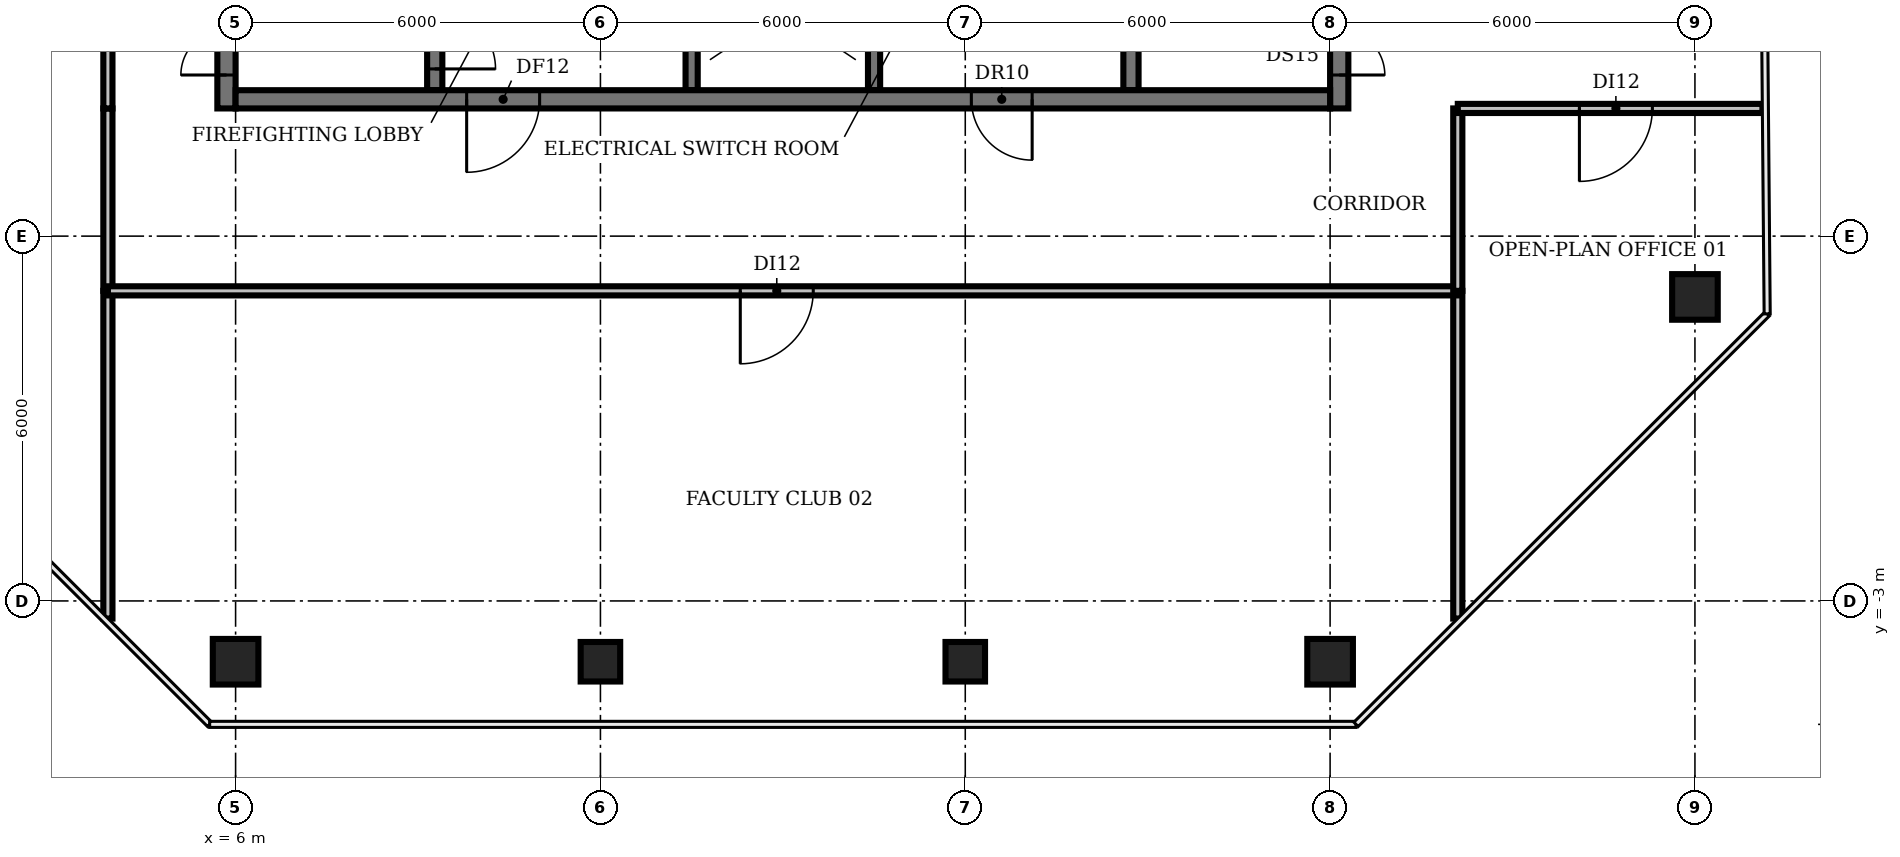
"""IFC4 building model, lengths in metres.
Left out: names, types, materials, properties, quantities, classifications, styles, units other than length and angle.
Written with IfcOpenShell. Run it as: python <this file> out.ifc"""

import sys

from ifc_helpers import new_model, si_unit, direction, frame, frame_2d, origin, origin_2d, place, context, subcontext, project, spatial, rectangle, circle, extrude, element, fill, save


model = new_model("IFC4")
c1 = context("Model", 3, precision=1e-05, world=origin(), true_north=direction((0.0, 1.0)))
c2 = subcontext(c1, "Body", "Model", "MODEL_VIEW")
j1 = project(units=[si_unit("LENGTHUNIT", "METRE"), si_unit("PLANEANGLEUNIT", "RADIAN")], contexts=[c1])
p1 = place(None, origin())
s1 = spatial("IfcSite", under=j1, at=p1, CompositionType="ELEMENT")
p2 = place(p1, origin())
s2 = spatial("IfcBuilding", under=s1, at=p2, CompositionType="ELEMENT")
p3 = place(p2, frame((0.0, 0.0, 331.4)))
s3 = spatial("IfcBuildingStorey", under=s2, at=p3, CompositionType="ELEMENT", Elevation=331.4)
p4 = place(p3, frame((6.0, -4.0, 0.0), z_axis=(0.0, 0.0, 1.0), x_axis=(1.0, 0.0, 0.0)))
e1 = element("IfcColumn", 1, at=p4, inside=s3, PredefinedType="COLUMN", context=c2, shape_type="SweptSolid", body=[
    extrude(circle(Radius=0.375, at=origin_2d()), origin(), (0.0, 0.0, 1.0), 3.9),
])
for number, where, z_axis, x_axis in (
    (2, (12.0, -4.0, 0.0), (0.0, 0.0, 1.0), (1.0, 0.0, 0.0)),
    (3, (18.0, -4.0, 0.0), (0.0, 0.0, 1.0), (1.0, 0.0, 0.0)),
):
    element("IfcColumn", number, at=place(p3, frame(where, z_axis=z_axis, x_axis=x_axis)), inside=s3, PredefinedType="COLUMN", context=c2, shape_type="SweptSolid", body=[
        extrude(rectangle(XDim=0.65, YDim=0.65, at=origin_2d()), origin(), (0.0, 0.0, 1.0), 3.9),
    ])
for number, where, z_axis, x_axis in (
    (4, (24.0, -4.0, 0.0), (0.0, 0.0, 1.0), (1.0, 0.0, 0.0)),
    (5, (30.0, 2.0, 0.0), (0.0, 0.0, 1.0), (1.0, 0.0, 0.0)),
):
    element("IfcColumn", number, at=place(p3, frame(where, z_axis=z_axis, x_axis=x_axis)), inside=s3, PredefinedType="COLUMN", context=c2, shape_type="SweptSolid", body=[
        extrude(circle(Radius=0.375, at=origin_2d()), origin(), (0.0, 0.0, 1.0), 3.9),
    ])
p5 = place(p3, frame((9.275, 11.825, 0.0), z_axis=(0.0, 0.0, 1.0), x_axis=(0.0, -1.0, 0.0)))
e6 = element("IfcWall", 6, at=p5, inside=s3, PredefinedType="SHEAR", context=c2, shape_type="SweptSolid", body=[
    extrude(rectangle(XDim=6.425, YDim=0.25, at=frame_2d((3.212, 0.0))), origin(), (0.0, 0.0, 1.0), 3.9),
])
p6 = place(p5, frame((5.075, 0.0, 0.0)))
e7 = element("IfcOpeningElement", 7, at=p6, cuts=e6, PredefinedType="OPENING", context=c2, shape_type="SweptSolid", body=[
    extrude(rectangle(XDim=1.0, YDim=2.1, at=frame_2d((0.5, 1.05))), frame((0.0, 0.135, 0.0), z_axis=(0.0, -1.0, 0.0), x_axis=(1.0, 0.0, 0.0)), (0.0, 0.0, 1.0), 0.27),
])
p7 = place(p3, frame((13.5, 5.4, 0.0), z_axis=(0.0, 0.0, 1.0), x_axis=(0.0, 1.0, 0.0)))
e8 = element("IfcWall", 8, at=p7, inside=s3, PredefinedType="SHEAR", context=c2, shape_type="SweptSolid", body=[
    extrude(rectangle(XDim=8.2, YDim=0.2, at=frame_2d((4.1, 0.0))), origin(), (0.0, 0.0, 1.0), 3.9),
])
p8 = place(p7, frame((0.75, 0.0, 0.0)))
e9 = element("IfcOpeningElement", 9, at=p8, cuts=e8, PredefinedType="OPENING", context=c2, shape_type="SweptSolid", body=[
    extrude(rectangle(XDim=1.1, YDim=2.1, at=frame_2d((0.55, 1.05))), frame((0.0, 0.11, 0.0), z_axis=(0.0, -1.0, 0.0), x_axis=(1.0, 0.0, 0.0)), (0.0, 0.0, 1.0), 0.22),
])
p9 = place(p7, frame((3.55, 0.0, 0.0)))
e10 = element("IfcOpeningElement", 10, at=p9, cuts=e8, PredefinedType="OPENING", context=c2, shape_type="SweptSolid", body=[
    extrude(rectangle(XDim=1.1, YDim=2.1, at=frame_2d((0.55, 1.05))), frame((0.0, 0.11, 0.0), z_axis=(0.0, -1.0, 0.0), x_axis=(1.0, 0.0, 0.0)), (0.0, 0.0, 1.0), 0.22),
])
p10 = place(p7, frame((6.35, 0.0, 0.0)))
e11 = element("IfcOpeningElement", 11, at=p10, cuts=e8, PredefinedType="OPENING", context=c2, shape_type="SweptSolid", body=[
    extrude(rectangle(XDim=1.1, YDim=2.1, at=frame_2d((0.55, 1.05))), frame((0.0, 0.11, 0.0), z_axis=(0.0, -1.0, 0.0), x_axis=(1.0, 0.0, 0.0)), (0.0, 0.0, 1.0), 0.22),
])
p11 = place(p3, frame((16.5, 5.4, 0.0), z_axis=(0.0, 0.0, 1.0), x_axis=(0.0, 1.0, 0.0)))
e12 = element("IfcWall", 12, at=p11, inside=s3, PredefinedType="SHEAR", context=c2, shape_type="SweptSolid", body=[
    extrude(rectangle(XDim=8.2, YDim=0.2, at=frame_2d((4.1, 0.0))), origin(), (0.0, 0.0, 1.0), 3.9),
])
p12 = place(p3, frame((20.725, 5.4, 0.0), z_axis=(0.0, 0.0, 1.0), x_axis=(0.0, 1.0, 0.0)))
e13 = element("IfcWall", 13, at=p12, inside=s3, PredefinedType="SHEAR", context=c2, shape_type="SweptSolid", body=[
    extrude(rectangle(XDim=6.3, YDim=0.25, at=frame_2d((3.15, 0.0))), origin(), (0.0, 0.0, 1.0), 3.9),
])
p13 = place(p3, frame((5.85, 5.1, 0.0), z_axis=(0.0, 0.0, 1.0), x_axis=(0.0, 1.0, 0.0)))
e14 = element("IfcWall", 14, at=p13, inside=s3, PredefinedType="SHEAR", context=c2, shape_type="SweptSolid", body=[
    extrude(rectangle(XDim=20.0, YDim=0.3, at=frame_2d((10.0, 0.0))), origin(), (0.0, 0.0, 1.0), 3.9),
])
p14 = place(p13, frame((0.55, 0.0, 0.0)))
e15 = element("IfcOpeningElement", 15, at=p14, cuts=e14, PredefinedType="OPENING", context=c2, shape_type="SweptSolid", body=[
    extrude(rectangle(XDim=1.5, YDim=2.1, at=frame_2d((0.75, 1.05))), frame((0.0, 0.16, 0.0), z_axis=(0.0, -1.0, 0.0), x_axis=(1.0, 0.0, 0.0)), (0.0, 0.0, 1.0), 0.32),
])
p15 = place(p13, frame((7.0, 0.0, 0.0)))
e16 = element("IfcOpeningElement", 16, at=p15, cuts=e14, PredefinedType="OPENING", context=c2, shape_type="SweptSolid", body=[
    extrude(rectangle(XDim=1.2, YDim=2.1, at=frame_2d((0.6, 1.05))), frame((0.0, 0.16, 0.0), z_axis=(0.0, -1.0, 0.0), x_axis=(1.0, 0.0, 0.0)), (0.0, 0.0, 1.0), 0.32),
])
p16 = place(p13, frame((13.55, 0.0, 0.0)))
e17 = element("IfcOpeningElement", 17, at=p16, cuts=e14, PredefinedType="OPENING", context=c2, shape_type="SweptSolid", body=[
    extrude(rectangle(XDim=1.2, YDim=2.1, at=frame_2d((0.6, 1.05))), frame((0.0, 0.16, 0.0), z_axis=(0.0, -1.0, 0.0), x_axis=(1.0, 0.0, 0.0)), (0.0, 0.0, 1.0), 0.32),
])
p17 = place(p3, frame((24.15, 25.705, 0.0), z_axis=(0.0, 0.0, 1.0), x_axis=(0.0, -1.0, 0.0)))
e18 = element("IfcWall", 18, at=p17, inside=s3, PredefinedType="SHEAR", context=c2, shape_type="SweptSolid", body=[
    extrude(rectangle(XDim=20.605, YDim=0.3, at=frame_2d((10.302, 0.0))), origin(), (0.0, 0.0, 1.0), 3.9),
])
p18 = place(p17, frame((18.555, 0.0, 0.0)))
e19 = element("IfcOpeningElement", 19, at=p18, cuts=e18, PredefinedType="OPENING", context=c2, shape_type="SweptSolid", body=[
    extrude(rectangle(XDim=1.5, YDim=2.1, at=frame_2d((0.75, 1.05))), frame((0.0, 0.16, 0.0), z_axis=(0.0, -1.0, 0.0), x_axis=(1.0, 0.0, 0.0)), (0.0, 0.0, 1.0), 0.32),
])
p19 = place(p17, frame((12.455, 0.0, 0.0)))
e20 = element("IfcOpeningElement", 20, at=p19, cuts=e18, PredefinedType="OPENING", context=c2, shape_type="SweptSolid", body=[
    extrude(rectangle(XDim=0.9, YDim=2.1, at=frame_2d((0.45, 1.05))), frame((0.0, 0.16, 0.0), z_axis=(0.0, -1.0, 0.0), x_axis=(1.0, 0.0, 0.0)), (0.0, 0.0, 1.0), 0.32),
])
p20 = place(p17, frame((6.455, 0.0, 0.0)))
e21 = element("IfcOpeningElement", 21, at=p20, cuts=e18, PredefinedType="OPENING", context=c2, shape_type="SweptSolid", body=[
    extrude(rectangle(XDim=2.0, YDim=2.1, at=frame_2d((1.0, 1.05))), frame((0.0, 0.16, 0.0), z_axis=(0.0, -1.0, 0.0), x_axis=(1.0, 0.0, 0.0)), (0.0, 0.0, 1.0), 0.32),
])
p21 = place(p3, frame((24.0, 5.25, 0.0), z_axis=(0.0, 0.0, 1.0), x_axis=(-1.0, 0.0, 0.0)))
e22 = element("IfcWall", 22, at=p21, inside=s3, PredefinedType="SHEAR", context=c2, shape_type="SweptSolid", body=[
    extrude(rectangle(XDim=18.0, YDim=0.3, at=frame_2d((9.0, 0.0))), origin(), (0.0, 0.0, 1.0), 3.9),
])
p22 = place(p21, frame((13.0, 0.0, 0.0)))
e23 = element("IfcOpeningElement", 23, at=p22, cuts=e22, PredefinedType="OPENING", context=c2, shape_type="SweptSolid", body=[
    extrude(rectangle(XDim=1.2, YDim=2.1, at=frame_2d((0.6, 1.05))), frame((0.0, 0.16, 0.0), z_axis=(0.0, -1.0, 0.0), x_axis=(1.0, 0.0, 0.0)), (0.0, 0.0, 1.0), 0.32),
])
p23 = place(p21, frame((4.9, 0.0, 0.0)))
e24 = element("IfcOpeningElement", 24, at=p23, cuts=e22, PredefinedType="OPENING", context=c2, shape_type="SweptSolid", body=[
    extrude(rectangle(XDim=1.0, YDim=2.1, at=frame_2d((0.5, 1.05))), frame((0.0, 0.16, 0.0), z_axis=(0.0, -1.0, 0.0), x_axis=(1.0, 0.0, 0.0)), (0.0, 0.0, 1.0), 0.32),
])
p24 = place(p3, frame((3.9, -3.29, 0.0), z_axis=(0.0, 0.0, 1.0), x_axis=(0.0, 1.0, 0.0)))
e25 = element("IfcWall", 25, at=p24, inside=s3, PredefinedType="PARTITIONING", context=c2, shape_type="SweptSolid", body=[
    extrude(rectangle(XDim=5.39, YDim=0.15, at=frame_2d((2.695, 0.0))), origin(), (0.0, 0.0, 1.0), 2.48),
])
p25 = place(p3, frame((3.9, 2.1, 0.0), z_axis=(0.0, 0.0, 1.0), x_axis=(0.0, 1.0, 0.0)))
e26 = element("IfcWall", 26, at=p25, inside=s3, PredefinedType="PARTITIONING", context=c2, shape_type="SweptSolid", body=[
    extrude(rectangle(XDim=3.0, YDim=0.15, at=frame_2d((1.5, 0.0))), origin(), (0.0, 0.0, 1.0), 2.48),
])
p26 = place(p3, frame((3.9, 5.1, 0.0), z_axis=(0.0, 0.0, 1.0), x_axis=(0.0, 1.0, 0.0)))
e27 = element("IfcWall", 27, at=p26, inside=s3, PredefinedType="PARTITIONING", context=c2, shape_type="SweptSolid", body=[
    extrude(rectangle(XDim=13.9, YDim=0.15, at=frame_2d((6.95, 0.0))), origin(), (0.0, 0.0, 1.0), 2.48),
])
p27 = place(p26, frame((6.2, 0.0, 0.0)))
e28 = element("IfcOpeningElement", 28, at=p27, cuts=e27, PredefinedType="OPENING", context=c2, shape_type="SweptSolid", body=[
    extrude(rectangle(XDim=1.2, YDim=2.1, at=frame_2d((0.6, 1.05))), frame((0.0, 0.085, 0.0), z_axis=(0.0, -1.0, 0.0), x_axis=(1.0, 0.0, 0.0)), (0.0, 0.0, 1.0), 0.17),
])
p28 = place(p3, frame((26.1, -3.29, 0.0), z_axis=(0.0, 0.0, 1.0), x_axis=(0.0, 1.0, 0.0)))
e29 = element("IfcWall", 29, at=p28, inside=s3, PredefinedType="PARTITIONING", context=c2, shape_type="SweptSolid", body=[
    extrude(rectangle(XDim=5.39, YDim=0.15, at=frame_2d((2.695, 0.0))), origin(), (0.0, 0.0, 1.0), 2.48),
])
p29 = place(p3, frame((26.1, 2.1, 0.0), z_axis=(0.0, 0.0, 1.0), x_axis=(-1.0, 0.0, 0.0)))
e30 = element("IfcWall", 30, at=p29, inside=s3, PredefinedType="PARTITIONING", context=c2, shape_type="SweptSolid", body=[
    extrude(rectangle(XDim=22.2, YDim=0.15, at=frame_2d((11.1, 0.0))), origin(), (0.0, 0.0, 1.0), 2.48),
])
p30 = place(p29, frame((10.6, 0.0, 0.0)))
e31 = element("IfcOpeningElement", 31, at=p30, cuts=e30, PredefinedType="OPENING", context=c2, shape_type="SweptSolid", body=[
    extrude(rectangle(XDim=1.2, YDim=2.1, at=frame_2d((0.6, 1.05))), frame((0.0, 0.085, 0.0), z_axis=(0.0, -1.0, 0.0), x_axis=(1.0, 0.0, 0.0)), (0.0, 0.0, 1.0), 0.17),
])
p31 = place(p3, frame((26.1, 2.1, 0.0), z_axis=(0.0, 0.0, 1.0), x_axis=(0.0, 1.0, 0.0)))
e32 = element("IfcWall", 32, at=p31, inside=s3, PredefinedType="PARTITIONING", context=c2, shape_type="SweptSolid", body=[
    extrude(rectangle(XDim=3.0, YDim=0.15, at=frame_2d((1.5, 0.0))), origin(), (0.0, 0.0, 1.0), 2.48),
])
p32 = place(p3, frame((31.11, 5.1, 0.0), z_axis=(0.0, 0.0, 1.0), x_axis=(-1.0, 0.0, 0.0)))
e33 = element("IfcWall", 33, at=p32, inside=s3, PredefinedType="PARTITIONING", context=c2, shape_type="SweptSolid", body=[
    extrude(rectangle(XDim=5.01, YDim=0.15, at=frame_2d((2.505, 0.0))), origin(), (0.0, 0.0, 1.0), 2.48),
])
p33 = place(p32, frame((1.81, 0.0, 0.0)))
e34 = element("IfcOpeningElement", 34, at=p33, cuts=e33, PredefinedType="OPENING", context=c2, shape_type="SweptSolid", body=[
    extrude(rectangle(XDim=1.2, YDim=2.1, at=frame_2d((0.6, 1.05))), frame((0.0, 0.085, 0.0), z_axis=(0.0, -1.0, 0.0), x_axis=(1.0, 0.0, 0.0)), (0.0, 0.0, 1.0), 0.17),
])
p34 = place(p6, origin())
e35 = element("IfcDoor", 35, at=p34, inside=s3, OperationType="SINGLE_SWING_RIGHT", PredefinedType="DOOR", context=c2, shape_type="SweptSolid", body=[
    extrude(rectangle(XDim=1.0, YDim=2.1, at=frame_2d((0.5, 1.05))), frame((0.0, 0.025, 0.0), z_axis=(0.0, -1.0, 0.0), x_axis=(1.0, 0.0, 0.0)), (0.0, 0.0, 1.0), 0.05),
])
fill(e7, e35)
p35 = place(p14, origin())
e36 = element("IfcDoor", 36, at=p35, inside=s3, OperationType="DOUBLE_DOOR_SINGLE_SWING", PredefinedType="DOOR", context=c2, shape_type="SweptSolid", body=[
    extrude(rectangle(XDim=1.5, YDim=2.1, at=frame_2d((0.75, 1.05))), frame((0.0, 0.025, 0.0), z_axis=(0.0, -1.0, 0.0), x_axis=(1.0, 0.0, 0.0)), (0.0, 0.0, 1.0), 0.05),
])
fill(e15, e36)
p36 = place(p18, origin())
e37 = element("IfcDoor", 37, at=p36, inside=s3, OperationType="DOUBLE_DOOR_SINGLE_SWING", PredefinedType="DOOR", context=c2, shape_type="SweptSolid", body=[
    extrude(rectangle(XDim=1.5, YDim=2.1, at=frame_2d((0.75, 1.05))), frame((0.0, 0.025, 0.0), z_axis=(0.0, -1.0, 0.0), x_axis=(1.0, 0.0, 0.0)), (0.0, 0.0, 1.0), 0.05),
])
fill(e19, e37)
p37 = place(p22, origin())
e38 = element("IfcDoor", 38, at=p37, inside=s3, OperationType="SINGLE_SWING_RIGHT", PredefinedType="DOOR", context=c2, shape_type="SweptSolid", body=[
    extrude(rectangle(XDim=1.2, YDim=2.1, at=frame_2d((0.6, 1.05))), frame((0.0, 0.025, 0.0), z_axis=(0.0, -1.0, 0.0), x_axis=(1.0, 0.0, 0.0)), (0.0, 0.0, 1.0), 0.05),
])
fill(e23, e38)
p38 = place(p23, origin())
e39 = element("IfcDoor", 39, at=p38, inside=s3, OperationType="SINGLE_SWING_LEFT", PredefinedType="DOOR", context=c2, shape_type="SweptSolid", body=[
    extrude(rectangle(XDim=1.0, YDim=2.1, at=frame_2d((0.5, 1.05))), frame((0.0, 0.025, 0.0), z_axis=(0.0, -1.0, 0.0), x_axis=(1.0, 0.0, 0.0)), (0.0, 0.0, 1.0), 0.05),
])
fill(e24, e39)
p39 = place(p30, origin())
e40 = element("IfcDoor", 40, at=p39, inside=s3, OperationType="SINGLE_SWING_RIGHT", PredefinedType="DOOR", context=c2, shape_type="SweptSolid", body=[
    extrude(rectangle(XDim=1.2, YDim=2.1, at=frame_2d((0.6, 1.05))), frame((0.0, 0.025, 0.0), z_axis=(0.0, -1.0, 0.0), x_axis=(1.0, 0.0, 0.0)), (0.0, 0.0, 1.0), 0.05),
])
fill(e31, e40)
p40 = place(p33, origin())
e41 = element("IfcDoor", 41, at=p40, inside=s3, OperationType="SINGLE_SWING_RIGHT", PredefinedType="DOOR", context=c2, shape_type="SweptSolid", body=[
    extrude(rectangle(XDim=1.2, YDim=2.1, at=frame_2d((0.6, 1.05))), frame((0.0, 0.025, 0.0), z_axis=(0.0, -1.0, 0.0), x_axis=(1.0, 0.0, 0.0)), (0.0, 0.0, 1.0), 0.05),
])
fill(e34, e41)
save(model, sys.argv[1])
